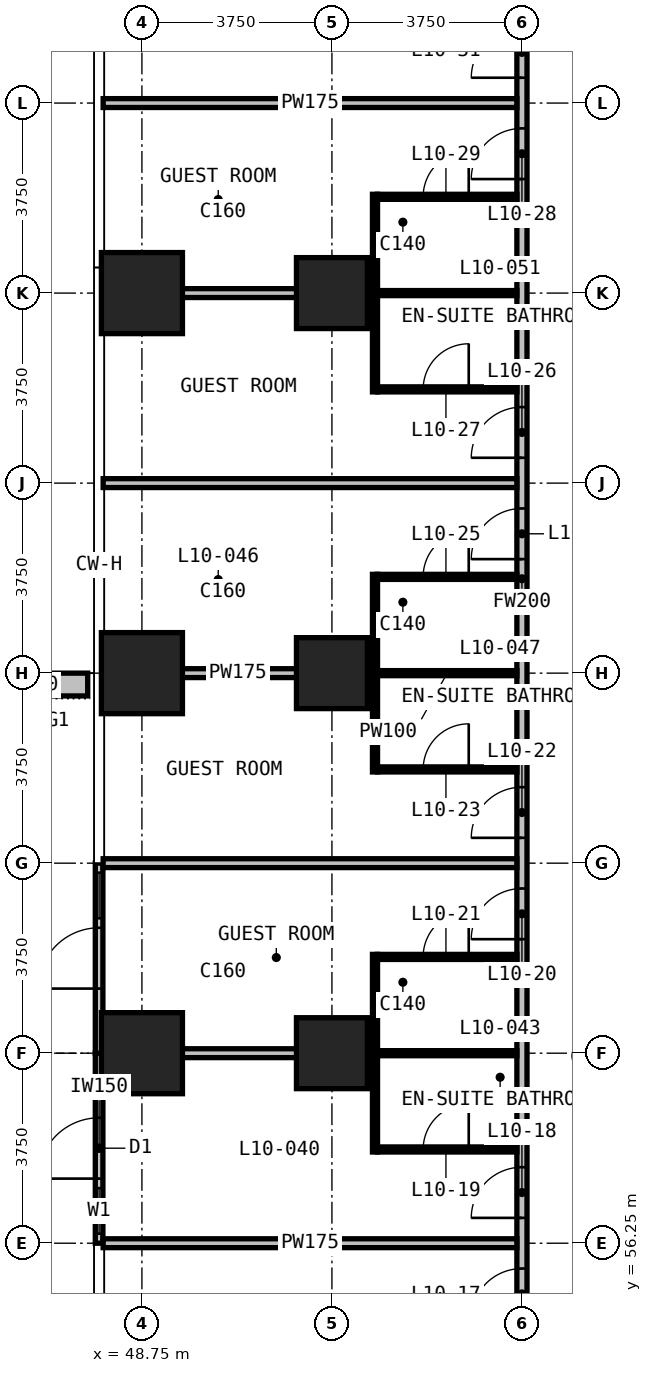
"""IFC4 building model, lengths in metres.
Left out: names, types, materials, properties, quantities, classifications, styles, units other than length and angle.
Written with IfcOpenShell. Run it as: python <this file> out.ifc"""

import sys

from ifc_helpers import new_model, si_unit, direction, frame, frame_2d, origin, origin_2d, place, context, subcontext, project, spatial, rectangle, extrude, element, fill, save


model = new_model("IFC4")
c1 = context("Model", 3, precision=1e-05, world=origin(), true_north=direction((0.0, 1.0)))
c2 = subcontext(c1, "Body", "Model", "MODEL_VIEW")
j1 = project(units=[si_unit("LENGTHUNIT", "METRE"), si_unit("PLANEANGLEUNIT", "RADIAN")], contexts=[c1])
p1 = place(None, origin())
s1 = spatial("IfcSite", under=j1, at=p1, CompositionType="ELEMENT")
p2 = place(p1, origin())
s2 = spatial("IfcBuilding", under=s1, at=p2, CompositionType="ELEMENT")
p3 = place(p2, frame((0.0, 0.0, 52.7)))
s3 = spatial("IfcBuildingStorey", under=s2, at=p3, CompositionType="ELEMENT", Elevation=52.7)
for number, where, z_axis, x_axis in (
    (1, (48.75, 60.0, 0.0), (0.0, 0.0, 1.0), (1.0, 0.0, 0.0)),
    (2, (48.75, 67.5, 0.0), (0.0, 0.0, 1.0), (1.0, 0.0, 0.0)),
    (3, (48.75, 75.0, 0.0), (0.0, 0.0, 1.0), (1.0, 0.0, 0.0)),
):
    element("IfcColumn", number, at=place(p3, frame(where, z_axis=z_axis, x_axis=x_axis)), inside=s3, PredefinedType="COLUMN", context=c2, shape_type="SweptSolid", body=[
        extrude(rectangle(XDim=1.6, YDim=1.6, at=origin_2d()), origin(), (0.0, 0.0, 1.0), 3.3),
    ])
for number, where, z_axis, x_axis in (
    (4, (52.5, 60.0, 0.0), (0.0, 0.0, 1.0), (1.0, 0.0, 0.0)),
    (5, (52.5, 67.5, 0.0), (0.0, 0.0, 1.0), (1.0, 0.0, 0.0)),
    (6, (52.5, 75.0, 0.0), (0.0, 0.0, 1.0), (1.0, 0.0, 0.0)),
):
    element("IfcColumn", number, at=place(p3, frame(where, z_axis=z_axis, x_axis=x_axis)), inside=s3, PredefinedType="COLUMN", context=c2, shape_type="SweptSolid", body=[
        extrude(rectangle(XDim=1.4, YDim=1.4, at=origin_2d()), origin(), (0.0, 0.0, 1.0), 3.3),
    ])
p4 = place(p3, frame((47.905, 56.25, 0.0), z_axis=(0.0, 0.0, 1.0), x_axis=(0.0, 1.0, 0.0)))
e7 = element("IfcWall", 7, at=p4, inside=s3, PredefinedType="SOLIDWALL", context=c2, shape_type="SweptSolid", body=[
    extrude(rectangle(XDim=3.75, YDim=0.15, at=frame_2d((1.875, 0.0))), origin(), (0.0, 0.0, 1.0), 3.0),
])
p5 = place(p4, frame((0.188, 0.0, 0.1)))
e8 = element("IfcOpeningElement", 8, at=p5, cuts=e7, PredefinedType="OPENING", context=c2, shape_type="SweptSolid", body=[
    extrude(rectangle(XDim=0.9, YDim=2.4, at=frame_2d((0.45, 1.2))), frame((0.0, 0.085, 0.0), z_axis=(0.0, -1.0, 0.0), x_axis=(1.0, 0.0, 0.0)), (0.0, 0.0, 1.0), 0.17),
])
p6 = place(p4, frame((1.275, 0.0, 0.0)))
e9 = element("IfcOpeningElement", 9, at=p6, cuts=e7, PredefinedType="OPENING", context=c2, shape_type="SweptSolid", body=[
    extrude(rectangle(XDim=1.2, YDim=2.4, at=frame_2d((0.6, 1.2))), frame((0.0, 0.085, 0.0), z_axis=(0.0, -1.0, 0.0), x_axis=(1.0, 0.0, 0.0)), (0.0, 0.0, 1.0), 0.17),
])
p7 = place(p3, frame((47.905, 60.0, 0.0), z_axis=(0.0, 0.0, 1.0), x_axis=(0.0, 1.0, 0.0)))
e10 = element("IfcWall", 10, at=p7, inside=s3, PredefinedType="SOLIDWALL", context=c2, shape_type="SweptSolid", body=[
    extrude(rectangle(XDim=3.75, YDim=0.15, at=frame_2d((1.875, 0.0))), origin(), (0.0, 0.0, 1.0), 3.0),
])
p8 = place(p7, frame((1.275, 0.0, 0.0)))
e11 = element("IfcOpeningElement", 11, at=p8, cuts=e10, PredefinedType="OPENING", context=c2, shape_type="SweptSolid", body=[
    extrude(rectangle(XDim=1.2, YDim=2.4, at=frame_2d((0.6, 1.2))), frame((0.0, 0.085, 0.0), z_axis=(0.0, -1.0, 0.0), x_axis=(1.0, 0.0, 0.0)), (0.0, 0.0, 1.0), 0.17),
])
p9 = place(p7, frame((2.663, 0.0, 0.1)))
e12 = element("IfcOpeningElement", 12, at=p9, cuts=e10, PredefinedType="OPENING", context=c2, shape_type="SweptSolid", body=[
    extrude(rectangle(XDim=0.9, YDim=2.4, at=frame_2d((0.45, 1.2))), frame((0.0, 0.085, 0.0), z_axis=(0.0, -1.0, 0.0), x_axis=(1.0, 0.0, 0.0)), (0.0, 0.0, 1.0), 0.17),
])
p10 = place(p3, frame((47.68, 67.275, 0.0), z_axis=(0.0, 0.0, 1.0), x_axis=(-1.0, 0.0, 0.0)))
e13 = element("IfcWall", 13, at=p10, inside=s3, PredefinedType="USERDEFINED", context=c2, shape_type="SweptSolid", body=[
    extrude(rectangle(XDim=2.33, YDim=0.45, at=frame_2d((1.165, 0.0))), origin(), (0.0, 0.0, 1.0), 1.1),
])
p11 = place(p3, frame((56.25, 52.4, 0.0), z_axis=(0.0, 0.0, 1.0), x_axis=(0.0, 1.0, 0.0)))
e14 = element("IfcWall", 14, at=p11, inside=s3, PredefinedType="PARTITIONING", context=c2, shape_type="SweptSolid", body=[
    extrude(rectangle(XDim=33.925, YDim=0.2, at=frame_2d((16.962, 0.0))), origin(), (0.0, 0.0, 1.0), 3.0),
])
p12 = place(p11, frame((2.35, 0.0, 0.0)))
e15 = element("IfcOpeningElement", 15, at=p12, cuts=e14, PredefinedType="OPENING", context=c2, shape_type="SweptSolid", body=[
    extrude(rectangle(XDim=1.0, YDim=2.2, at=frame_2d((0.5, 1.1))), frame((0.0, 0.11, 0.0), z_axis=(0.0, -1.0, 0.0), x_axis=(1.0, 0.0, 0.0)), (0.0, 0.0, 1.0), 0.22),
])
p13 = place(p11, frame((4.35, 0.0, 0.0)))
e16 = element("IfcOpeningElement", 16, at=p13, cuts=e14, PredefinedType="OPENING", context=c2, shape_type="SweptSolid", body=[
    extrude(rectangle(XDim=1.0, YDim=2.2, at=frame_2d((0.5, 1.1))), frame((0.0, 0.11, 0.0), z_axis=(0.0, -1.0, 0.0), x_axis=(1.0, 0.0, 0.0)), (0.0, 0.0, 1.0), 0.22),
])
p14 = place(p11, frame((9.85, 0.0, 0.0)))
e17 = element("IfcOpeningElement", 17, at=p14, cuts=e14, PredefinedType="OPENING", context=c2, shape_type="SweptSolid", body=[
    extrude(rectangle(XDim=1.0, YDim=2.2, at=frame_2d((0.5, 1.1))), frame((0.0, 0.11, 0.0), z_axis=(0.0, -1.0, 0.0), x_axis=(1.0, 0.0, 0.0)), (0.0, 0.0, 1.0), 0.22),
])
p15 = place(p11, frame((11.85, 0.0, 0.0)))
e18 = element("IfcOpeningElement", 18, at=p15, cuts=e14, PredefinedType="OPENING", context=c2, shape_type="SweptSolid", body=[
    extrude(rectangle(XDim=1.0, YDim=2.2, at=frame_2d((0.5, 1.1))), frame((0.0, 0.11, 0.0), z_axis=(0.0, -1.0, 0.0), x_axis=(1.0, 0.0, 0.0)), (0.0, 0.0, 1.0), 0.22),
])
p16 = place(p11, frame((17.35, 0.0, 0.0)))
e19 = element("IfcOpeningElement", 19, at=p16, cuts=e14, PredefinedType="OPENING", context=c2, shape_type="SweptSolid", body=[
    extrude(rectangle(XDim=1.0, YDim=2.2, at=frame_2d((0.5, 1.1))), frame((0.0, 0.11, 0.0), z_axis=(0.0, -1.0, 0.0), x_axis=(1.0, 0.0, 0.0)), (0.0, 0.0, 1.0), 0.22),
])
p17 = place(p11, frame((19.35, 0.0, 0.0)))
e20 = element("IfcOpeningElement", 20, at=p17, cuts=e14, PredefinedType="OPENING", context=c2, shape_type="SweptSolid", body=[
    extrude(rectangle(XDim=1.0, YDim=2.2, at=frame_2d((0.5, 1.1))), frame((0.0, 0.11, 0.0), z_axis=(0.0, -1.0, 0.0), x_axis=(1.0, 0.0, 0.0)), (0.0, 0.0, 1.0), 0.22),
])
p18 = place(p11, frame((24.85, 0.0, 0.0)))
e21 = element("IfcOpeningElement", 21, at=p18, cuts=e14, PredefinedType="OPENING", context=c2, shape_type="SweptSolid", body=[
    extrude(rectangle(XDim=1.0, YDim=2.2, at=frame_2d((0.5, 1.1))), frame((0.0, 0.11, 0.0), z_axis=(0.0, -1.0, 0.0), x_axis=(1.0, 0.0, 0.0)), (0.0, 0.0, 1.0), 0.22),
])
p19 = place(p11, frame((26.85, 0.0, 0.0)))
e22 = element("IfcOpeningElement", 22, at=p19, cuts=e14, PredefinedType="OPENING", context=c2, shape_type="SweptSolid", body=[
    extrude(rectangle(XDim=1.0, YDim=2.2, at=frame_2d((0.5, 1.1))), frame((0.0, 0.11, 0.0), z_axis=(0.0, -1.0, 0.0), x_axis=(1.0, 0.0, 0.0)), (0.0, 0.0, 1.0), 0.22),
])
p20 = place(p11, frame((31.55, 0.0, 0.0)))
e23 = element("IfcOpeningElement", 23, at=p20, cuts=e14, PredefinedType="OPENING", context=c2, shape_type="SweptSolid", body=[
    extrude(rectangle(XDim=0.9, YDim=2.2, at=frame_2d((0.45, 1.1))), frame((0.0, 0.11, 0.0), z_axis=(0.0, -1.0, 0.0), x_axis=(1.0, 0.0, 0.0)), (0.0, 0.0, 1.0), 0.22),
])
p21 = place(p3, frame((47.985, 56.25, 0.0), z_axis=(0.0, 0.0, 1.0), x_axis=(1.0, 0.0, 0.0)))
e24 = element("IfcWall", 24, at=p21, inside=s3, PredefinedType="PARTITIONING", context=c2, shape_type="SweptSolid", body=[
    extrude(rectangle(XDim=8.165, YDim=0.175, at=frame_2d((4.083, 0.0))), origin(), (0.0, 0.0, 1.0), 3.0),
])
p22 = place(p3, frame((47.985, 60.0, 0.0), z_axis=(0.0, 0.0, 1.0), x_axis=(1.0, 0.0, 0.0)))
e25 = element("IfcWall", 25, at=p22, inside=s3, PredefinedType="PARTITIONING", context=c2, shape_type="SweptSolid", body=[
    extrude(rectangle(XDim=5.315, YDim=0.175, at=frame_2d((2.657, 0.0))), origin(), (0.0, 0.0, 1.0), 3.0),
])
p23 = place(p3, frame((47.985, 63.75, 0.0), z_axis=(0.0, 0.0, 1.0), x_axis=(1.0, 0.0, 0.0)))
e26 = element("IfcWall", 26, at=p23, inside=s3, PredefinedType="PARTITIONING", context=c2, shape_type="SweptSolid", body=[
    extrude(rectangle(XDim=8.165, YDim=0.175, at=frame_2d((4.083, 0.0))), origin(), (0.0, 0.0, 1.0), 3.0),
])
p24 = place(p3, frame((47.985, 67.5, 0.0), z_axis=(0.0, 0.0, 1.0), x_axis=(1.0, 0.0, 0.0)))
e27 = element("IfcWall", 27, at=p24, inside=s3, PredefinedType="PARTITIONING", context=c2, shape_type="SweptSolid", body=[
    extrude(rectangle(XDim=5.315, YDim=0.175, at=frame_2d((2.657, 0.0))), origin(), (0.0, 0.0, 1.0), 3.0),
])
p25 = place(p3, frame((47.985, 71.25, 0.0), z_axis=(0.0, 0.0, 1.0), x_axis=(1.0, 0.0, 0.0)))
e28 = element("IfcWall", 28, at=p25, inside=s3, PredefinedType="PARTITIONING", context=c2, shape_type="SweptSolid", body=[
    extrude(rectangle(XDim=8.165, YDim=0.175, at=frame_2d((4.083, 0.0))), origin(), (0.0, 0.0, 1.0), 3.0),
])
p26 = place(p3, frame((47.985, 75.0, 0.0), z_axis=(0.0, 0.0, 1.0), x_axis=(1.0, 0.0, 0.0)))
e29 = element("IfcWall", 29, at=p26, inside=s3, PredefinedType="PARTITIONING", context=c2, shape_type="SweptSolid", body=[
    extrude(rectangle(XDim=5.315, YDim=0.175, at=frame_2d((2.657, 0.0))), origin(), (0.0, 0.0, 1.0), 3.0),
])
p27 = place(p3, frame((47.985, 78.75, 0.0), z_axis=(0.0, 0.0, 1.0), x_axis=(1.0, 0.0, 0.0)))
e30 = element("IfcWall", 30, at=p27, inside=s3, PredefinedType="PARTITIONING", context=c2, shape_type="SweptSolid", body=[
    extrude(rectangle(XDim=8.165, YDim=0.175, at=frame_2d((4.083, 0.0))), origin(), (0.0, 0.0, 1.0), 3.0),
])
p28 = place(p3, frame((53.4, 58.1, 0.0), z_axis=(0.0, 0.0, 1.0), x_axis=(1.0, 0.0, 0.0)))
e31 = element("IfcWall", 31, at=p28, inside=s3, PredefinedType="PARTITIONING", context=c2, shape_type="SweptSolid", body=[
    extrude(rectangle(XDim=2.75, YDim=0.1, at=frame_2d((1.375, 0.0))), origin(), (0.0, 0.0, 1.0), 3.0),
])
p29 = place(p28, frame((0.9, 0.0, 0.0)))
e32 = element("IfcOpeningElement", 32, at=p29, cuts=e31, PredefinedType="OPENING", context=c2, shape_type="SweptSolid", body=[
    extrude(rectangle(XDim=0.9, YDim=2.2, at=frame_2d((0.45, 1.1))), frame((0.0, 0.06, 0.0), z_axis=(0.0, -1.0, 0.0), x_axis=(1.0, 0.0, 0.0)), (0.0, 0.0, 1.0), 0.12),
])
p30 = place(p3, frame((53.4, 60.0, 0.0), z_axis=(0.0, 0.0, 1.0), x_axis=(1.0, 0.0, 0.0)))
e33 = element("IfcWall", 33, at=p30, inside=s3, PredefinedType="PARTITIONING", context=c2, shape_type="SweptSolid", body=[
    extrude(rectangle(XDim=2.75, YDim=0.1, at=frame_2d((1.375, 0.0))), origin(), (0.0, 0.0, 1.0), 3.0),
])
p31 = place(p3, frame((53.4, 61.9, 0.0), z_axis=(0.0, 0.0, 1.0), x_axis=(1.0, 0.0, 0.0)))
e34 = element("IfcWall", 34, at=p31, inside=s3, PredefinedType="PARTITIONING", context=c2, shape_type="SweptSolid", body=[
    extrude(rectangle(XDim=2.75, YDim=0.1, at=frame_2d((1.375, 0.0))), origin(), (0.0, 0.0, 1.0), 3.0),
])
p32 = place(p31, frame((0.9, 0.0, 0.0)))
e35 = element("IfcOpeningElement", 35, at=p32, cuts=e34, PredefinedType="OPENING", context=c2, shape_type="SweptSolid", body=[
    extrude(rectangle(XDim=0.9, YDim=2.2, at=frame_2d((0.45, 1.1))), frame((0.0, 0.06, 0.0), z_axis=(0.0, -1.0, 0.0), x_axis=(1.0, 0.0, 0.0)), (0.0, 0.0, 1.0), 0.12),
])
p33 = place(p3, frame((53.4, 65.6, 0.0), z_axis=(0.0, 0.0, 1.0), x_axis=(1.0, 0.0, 0.0)))
e36 = element("IfcWall", 36, at=p33, inside=s3, PredefinedType="PARTITIONING", context=c2, shape_type="SweptSolid", body=[
    extrude(rectangle(XDim=2.75, YDim=0.1, at=frame_2d((1.375, 0.0))), origin(), (0.0, 0.0, 1.0), 3.0),
])
p34 = place(p33, frame((0.9, 0.0, 0.0)))
e37 = element("IfcOpeningElement", 37, at=p34, cuts=e36, PredefinedType="OPENING", context=c2, shape_type="SweptSolid", body=[
    extrude(rectangle(XDim=0.9, YDim=2.2, at=frame_2d((0.45, 1.1))), frame((0.0, 0.06, 0.0), z_axis=(0.0, -1.0, 0.0), x_axis=(1.0, 0.0, 0.0)), (0.0, 0.0, 1.0), 0.12),
])
p35 = place(p3, frame((53.4, 67.5, 0.0), z_axis=(0.0, 0.0, 1.0), x_axis=(1.0, 0.0, 0.0)))
e38 = element("IfcWall", 38, at=p35, inside=s3, PredefinedType="PARTITIONING", context=c2, shape_type="SweptSolid", body=[
    extrude(rectangle(XDim=2.75, YDim=0.1, at=frame_2d((1.375, 0.0))), origin(), (0.0, 0.0, 1.0), 3.0),
])
p36 = place(p3, frame((53.4, 69.4, 0.0), z_axis=(0.0, 0.0, 1.0), x_axis=(1.0, 0.0, 0.0)))
e39 = element("IfcWall", 39, at=p36, inside=s3, PredefinedType="PARTITIONING", context=c2, shape_type="SweptSolid", body=[
    extrude(rectangle(XDim=2.75, YDim=0.1, at=frame_2d((1.375, 0.0))), origin(), (0.0, 0.0, 1.0), 3.0),
])
p37 = place(p36, frame((0.9, 0.0, 0.0)))
e40 = element("IfcOpeningElement", 40, at=p37, cuts=e39, PredefinedType="OPENING", context=c2, shape_type="SweptSolid", body=[
    extrude(rectangle(XDim=0.9, YDim=2.2, at=frame_2d((0.45, 1.1))), frame((0.0, 0.06, 0.0), z_axis=(0.0, -1.0, 0.0), x_axis=(1.0, 0.0, 0.0)), (0.0, 0.0, 1.0), 0.12),
])
p38 = place(p3, frame((53.4, 73.1, 0.0), z_axis=(0.0, 0.0, 1.0), x_axis=(1.0, 0.0, 0.0)))
e41 = element("IfcWall", 41, at=p38, inside=s3, PredefinedType="PARTITIONING", context=c2, shape_type="SweptSolid", body=[
    extrude(rectangle(XDim=2.75, YDim=0.1, at=frame_2d((1.375, 0.0))), origin(), (0.0, 0.0, 1.0), 3.0),
])
p39 = place(p38, frame((0.9, 0.0, 0.0)))
e42 = element("IfcOpeningElement", 42, at=p39, cuts=e41, PredefinedType="OPENING", context=c2, shape_type="SweptSolid", body=[
    extrude(rectangle(XDim=0.9, YDim=2.2, at=frame_2d((0.45, 1.1))), frame((0.0, 0.06, 0.0), z_axis=(0.0, -1.0, 0.0), x_axis=(1.0, 0.0, 0.0)), (0.0, 0.0, 1.0), 0.12),
])
p40 = place(p3, frame((53.4, 75.0, 0.0), z_axis=(0.0, 0.0, 1.0), x_axis=(1.0, 0.0, 0.0)))
e43 = element("IfcWall", 43, at=p40, inside=s3, PredefinedType="PARTITIONING", context=c2, shape_type="SweptSolid", body=[
    extrude(rectangle(XDim=2.75, YDim=0.1, at=frame_2d((1.375, 0.0))), origin(), (0.0, 0.0, 1.0), 3.0),
])
p41 = place(p3, frame((53.4, 76.9, 0.0), z_axis=(0.0, 0.0, 1.0), x_axis=(1.0, 0.0, 0.0)))
e44 = element("IfcWall", 44, at=p41, inside=s3, PredefinedType="PARTITIONING", context=c2, shape_type="SweptSolid", body=[
    extrude(rectangle(XDim=2.75, YDim=0.1, at=frame_2d((1.375, 0.0))), origin(), (0.0, 0.0, 1.0), 3.0),
])
p42 = place(p41, frame((0.9, 0.0, 0.0)))
e45 = element("IfcOpeningElement", 45, at=p42, cuts=e44, PredefinedType="OPENING", context=c2, shape_type="SweptSolid", body=[
    extrude(rectangle(XDim=0.9, YDim=2.2, at=frame_2d((0.45, 1.1))), frame((0.0, 0.06, 0.0), z_axis=(0.0, -1.0, 0.0), x_axis=(1.0, 0.0, 0.0)), (0.0, 0.0, 1.0), 0.12),
])
for number, where, z_axis, x_axis in (
    (46, (53.35, 58.05, 0.0), (0.0, 0.0, 1.0), (0.0, 1.0, 0.0)),
    (47, (53.35, 65.55, 0.0), (0.0, 0.0, 1.0), (0.0, 1.0, 0.0)),
    (48, (53.35, 73.05, 0.0), (0.0, 0.0, 1.0), (0.0, 1.0, 0.0)),
):
    element("IfcWall", number, at=place(p3, frame(where, z_axis=z_axis, x_axis=x_axis)), inside=s3, PredefinedType="PARTITIONING", context=c2, shape_type="SweptSolid", body=[
        extrude(rectangle(XDim=3.9, YDim=0.1, at=frame_2d((1.95, 0.0))), origin(), (0.0, 0.0, 1.0), 3.0),
    ])
p43 = place(p5, origin())
e49 = element("IfcWindow", 49, at=p43, inside=s3, PartitioningType="SINGLE_PANEL", PredefinedType="WINDOW", context=c2, shape_type="SweptSolid", body=[
    extrude(rectangle(XDim=0.9, YDim=2.4, at=frame_2d((0.45, 1.2))), frame((0.0, 0.03, 0.0), z_axis=(0.0, -1.0, 0.0), x_axis=(1.0, 0.0, 0.0)), (0.0, 0.0, 1.0), 0.06),
])
fill(e8, e49)
p44 = place(p6, origin())
e50 = element("IfcDoor", 50, at=p44, inside=s3, OperationType="SINGLE_SWING_LEFT", PredefinedType="DOOR", context=c2, shape_type="SweptSolid", body=[
    extrude(rectangle(XDim=1.2, YDim=2.4, at=frame_2d((0.6, 1.2))), frame((0.0, 0.025, 0.0), z_axis=(0.0, -1.0, 0.0), x_axis=(1.0, 0.0, 0.0)), (0.0, 0.0, 1.0), 0.05),
])
fill(e9, e50)
p45 = place(p8, origin())
e51 = element("IfcDoor", 51, at=p45, inside=s3, OperationType="SINGLE_SWING_LEFT", PredefinedType="DOOR", context=c2, shape_type="SweptSolid", body=[
    extrude(rectangle(XDim=1.2, YDim=2.4, at=frame_2d((0.6, 1.2))), frame((0.0, 0.025, 0.0), z_axis=(0.0, -1.0, 0.0), x_axis=(1.0, 0.0, 0.0)), (0.0, 0.0, 1.0), 0.05),
])
fill(e11, e51)
p46 = place(p9, origin())
e52 = element("IfcWindow", 52, at=p46, inside=s3, PartitioningType="SINGLE_PANEL", PredefinedType="WINDOW", context=c2, shape_type="SweptSolid", body=[
    extrude(rectangle(XDim=0.9, YDim=2.4, at=frame_2d((0.45, 1.2))), frame((0.0, 0.03, 0.0), z_axis=(0.0, -1.0, 0.0), x_axis=(1.0, 0.0, 0.0)), (0.0, 0.0, 1.0), 0.06),
])
fill(e12, e52)
p47 = place(p12, origin())
e53 = element("IfcDoor", 53, at=p47, inside=s3, OperationType="SINGLE_SWING_RIGHT", PredefinedType="DOOR", context=c2, shape_type="SweptSolid", body=[
    extrude(rectangle(XDim=1.0, YDim=2.2, at=frame_2d((0.5, 1.1))), frame((0.0, 0.025, 0.0), z_axis=(0.0, -1.0, 0.0), x_axis=(1.0, 0.0, 0.0)), (0.0, 0.0, 1.0), 0.05),
])
fill(e15, e53)
p48 = place(p13, origin())
e54 = element("IfcDoor", 54, at=p48, inside=s3, OperationType="SINGLE_SWING_LEFT", PredefinedType="DOOR", context=c2, shape_type="SweptSolid", body=[
    extrude(rectangle(XDim=1.0, YDim=2.2, at=frame_2d((0.5, 1.1))), frame((0.0, 0.025, 0.0), z_axis=(0.0, -1.0, 0.0), x_axis=(1.0, 0.0, 0.0)), (0.0, 0.0, 1.0), 0.05),
])
fill(e16, e54)
p49 = place(p29, origin())
e55 = element("IfcDoor", 55, at=p49, inside=s3, OperationType="SINGLE_SWING_RIGHT", PredefinedType="DOOR", context=c2, shape_type="SweptSolid", body=[
    extrude(rectangle(XDim=0.9, YDim=2.2, at=frame_2d((0.45, 1.1))), frame((0.0, 0.025, 0.0), z_axis=(0.0, -1.0, 0.0), x_axis=(1.0, 0.0, 0.0)), (0.0, 0.0, 1.0), 0.05),
])
fill(e32, e55)
p50 = place(p14, origin())
e56 = element("IfcDoor", 56, at=p50, inside=s3, OperationType="SINGLE_SWING_LEFT", PredefinedType="DOOR", context=c2, shape_type="SweptSolid", body=[
    extrude(rectangle(XDim=1.0, YDim=2.2, at=frame_2d((0.5, 1.1))), frame((0.0, 0.025, 0.0), z_axis=(0.0, -1.0, 0.0), x_axis=(1.0, 0.0, 0.0)), (0.0, 0.0, 1.0), 0.05),
])
fill(e17, e56)
p51 = place(p32, origin())
e57 = element("IfcDoor", 57, at=p51, inside=s3, OperationType="SINGLE_SWING_RIGHT", PredefinedType="DOOR", context=c2, shape_type="SweptSolid", body=[
    extrude(rectangle(XDim=0.9, YDim=2.2, at=frame_2d((0.45, 1.1))), frame((0.0, 0.025, 0.0), z_axis=(0.0, -1.0, 0.0), x_axis=(1.0, 0.0, 0.0)), (0.0, 0.0, 1.0), 0.05),
])
fill(e35, e57)
p52 = place(p15, origin())
e58 = element("IfcDoor", 58, at=p52, inside=s3, OperationType="SINGLE_SWING_LEFT", PredefinedType="DOOR", context=c2, shape_type="SweptSolid", body=[
    extrude(rectangle(XDim=1.0, YDim=2.2, at=frame_2d((0.5, 1.1))), frame((0.0, 0.025, 0.0), z_axis=(0.0, -1.0, 0.0), x_axis=(1.0, 0.0, 0.0)), (0.0, 0.0, 1.0), 0.05),
])
fill(e18, e58)
p53 = place(p34, origin())
e59 = element("IfcDoor", 59, at=p53, inside=s3, OperationType="SINGLE_SWING_RIGHT", PredefinedType="DOOR", context=c2, shape_type="SweptSolid", body=[
    extrude(rectangle(XDim=0.9, YDim=2.2, at=frame_2d((0.45, 1.1))), frame((0.0, 0.025, 0.0), z_axis=(0.0, -1.0, 0.0), x_axis=(1.0, 0.0, 0.0)), (0.0, 0.0, 1.0), 0.05),
])
fill(e37, e59)
p54 = place(p16, origin())
e60 = element("IfcDoor", 60, at=p54, inside=s3, OperationType="SINGLE_SWING_LEFT", PredefinedType="DOOR", context=c2, shape_type="SweptSolid", body=[
    extrude(rectangle(XDim=1.0, YDim=2.2, at=frame_2d((0.5, 1.1))), frame((0.0, 0.025, 0.0), z_axis=(0.0, -1.0, 0.0), x_axis=(1.0, 0.0, 0.0)), (0.0, 0.0, 1.0), 0.05),
])
fill(e19, e60)
p55 = place(p37, origin())
e61 = element("IfcDoor", 61, at=p55, inside=s3, OperationType="SINGLE_SWING_RIGHT", PredefinedType="DOOR", context=c2, shape_type="SweptSolid", body=[
    extrude(rectangle(XDim=0.9, YDim=2.2, at=frame_2d((0.45, 1.1))), frame((0.0, 0.025, 0.0), z_axis=(0.0, -1.0, 0.0), x_axis=(1.0, 0.0, 0.0)), (0.0, 0.0, 1.0), 0.05),
])
fill(e40, e61)
p56 = place(p17, origin())
e62 = element("IfcDoor", 62, at=p56, inside=s3, OperationType="SINGLE_SWING_LEFT", PredefinedType="DOOR", context=c2, shape_type="SweptSolid", body=[
    extrude(rectangle(XDim=1.0, YDim=2.2, at=frame_2d((0.5, 1.1))), frame((0.0, 0.025, 0.0), z_axis=(0.0, -1.0, 0.0), x_axis=(1.0, 0.0, 0.0)), (0.0, 0.0, 1.0), 0.05),
])
fill(e20, e62)
p57 = place(p39, origin())
e63 = element("IfcDoor", 63, at=p57, inside=s3, OperationType="SINGLE_SWING_RIGHT", PredefinedType="DOOR", context=c2, shape_type="SweptSolid", body=[
    extrude(rectangle(XDim=0.9, YDim=2.2, at=frame_2d((0.45, 1.1))), frame((0.0, 0.025, 0.0), z_axis=(0.0, -1.0, 0.0), x_axis=(1.0, 0.0, 0.0)), (0.0, 0.0, 1.0), 0.05),
])
fill(e42, e63)
p58 = place(p18, origin())
e64 = element("IfcDoor", 64, at=p58, inside=s3, OperationType="SINGLE_SWING_LEFT", PredefinedType="DOOR", context=c2, shape_type="SweptSolid", body=[
    extrude(rectangle(XDim=1.0, YDim=2.2, at=frame_2d((0.5, 1.1))), frame((0.0, 0.025, 0.0), z_axis=(0.0, -1.0, 0.0), x_axis=(1.0, 0.0, 0.0)), (0.0, 0.0, 1.0), 0.05),
])
fill(e21, e64)
p59 = place(p42, origin())
e65 = element("IfcDoor", 65, at=p59, inside=s3, OperationType="SINGLE_SWING_RIGHT", PredefinedType="DOOR", context=c2, shape_type="SweptSolid", body=[
    extrude(rectangle(XDim=0.9, YDim=2.2, at=frame_2d((0.45, 1.1))), frame((0.0, 0.025, 0.0), z_axis=(0.0, -1.0, 0.0), x_axis=(1.0, 0.0, 0.0)), (0.0, 0.0, 1.0), 0.05),
])
fill(e45, e65)
p60 = place(p19, origin())
e66 = element("IfcDoor", 66, at=p60, inside=s3, OperationType="SINGLE_SWING_RIGHT", PredefinedType="DOOR", context=c2, shape_type="SweptSolid", body=[
    extrude(rectangle(XDim=1.0, YDim=2.2, at=frame_2d((0.5, 1.1))), frame((0.0, 0.025, 0.0), z_axis=(0.0, -1.0, 0.0), x_axis=(1.0, 0.0, 0.0)), (0.0, 0.0, 1.0), 0.05),
])
fill(e22, e66)
save(model, sys.argv[1])
